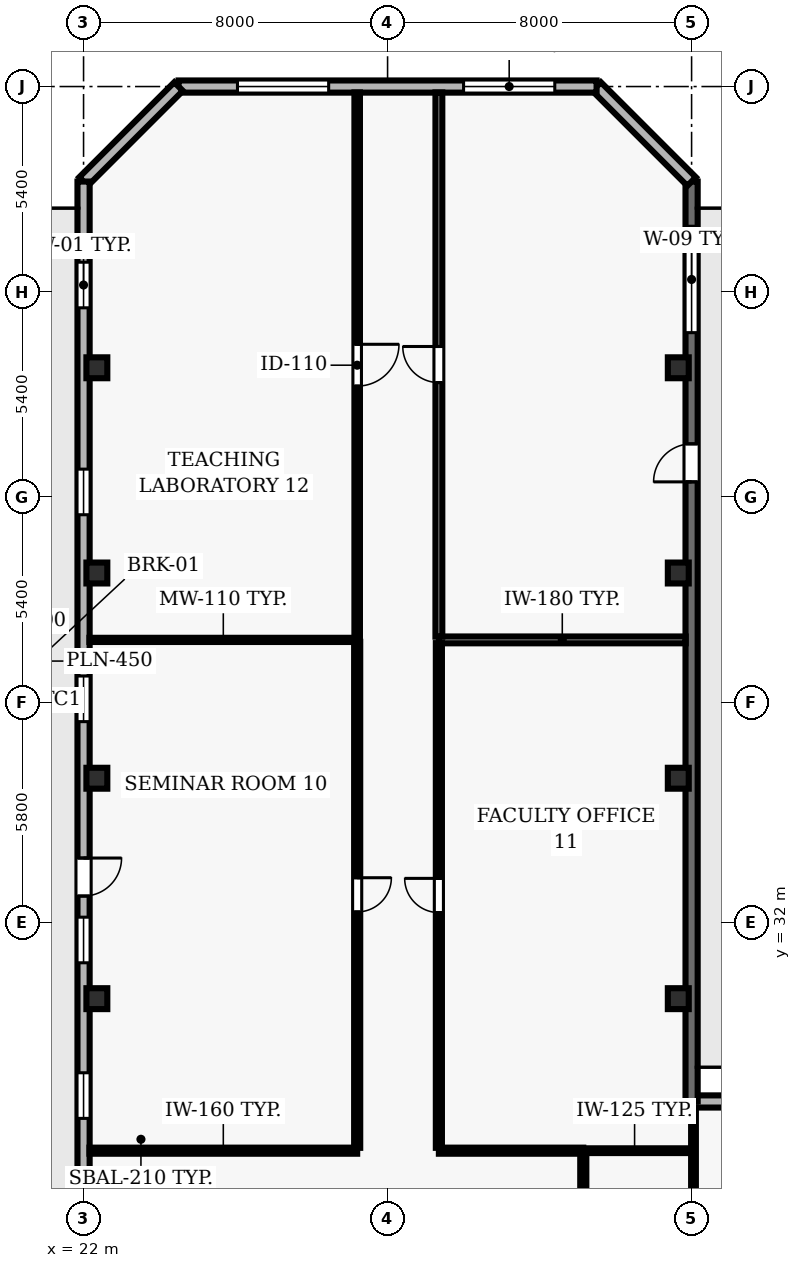
"""IFC4 building model, lengths in metres.
Left out: names, types, materials, properties, quantities, classifications, styles, units other than length and angle.
Written with IfcOpenShell. Run it as: python <this file> out.ifc"""

import sys

from ifc_helpers import new_model, si_unit, direction, frame, frame_2d, origin, origin_2d, place, context, subcontext, project, spatial, rectangle, hollow_rectangle, extrude, element, fill, save


model = new_model("IFC4")
c1 = context("Model", 3, precision=1e-05, world=origin(), true_north=direction((0.0, 1.0)))
c2 = subcontext(c1, "Body", "Model", "MODEL_VIEW")
j1 = project(units=[si_unit("LENGTHUNIT", "METRE"), si_unit("PLANEANGLEUNIT", "RADIAN")], contexts=[c1])
p1 = place(None, origin())
s1 = spatial("IfcSite", under=j1, at=p1, CompositionType="ELEMENT")
p2 = place(p1, origin())
s2 = spatial("IfcBuilding", under=s1, at=p2, CompositionType="ELEMENT")
p3 = place(p2, frame((0.0, 0.0, 54.4)))
s3 = spatial("IfcBuildingStorey", under=s2, at=p3, CompositionType="ELEMENT", Elevation=54.4)
for number, where, z_axis, x_axis in (
    (1, (22.35, 30.0, 0.0), (0.0, 0.0, 1.0), (1.0, 0.0, 0.0)),
    (2, (37.65, 30.0, 0.0), (0.0, 0.0, 1.0), (1.0, 0.0, 0.0)),
    (3, (22.35, 35.8, 0.0), (0.0, 0.0, 1.0), (1.0, 0.0, 0.0)),
    (4, (37.65, 35.8, 0.0), (0.0, 0.0, 1.0), (1.0, 0.0, 0.0)),
    (5, (22.35, 41.2, 0.0), (0.0, 0.0, 1.0), (1.0, 0.0, 0.0)),
    (6, (37.65, 41.2, 0.0), (0.0, 0.0, 1.0), (1.0, 0.0, 0.0)),
    (7, (22.35, 46.6, 0.0), (0.0, 0.0, 1.0), (1.0, 0.0, 0.0)),
    (8, (37.65, 46.6, 0.0), (0.0, 0.0, 1.0), (1.0, 0.0, 0.0)),
):
    element("IfcColumn", number, at=place(p3, frame(where, z_axis=z_axis, x_axis=x_axis)), inside=s3, PredefinedType="COLUMN", context=c2, shape_type="SweptSolid", body=[
        extrude(hollow_rectangle(XDim=0.55, YDim=0.55, WallThickness=0.025, at=origin_2d()), origin(), (0.0, 0.0, 1.0), 3.9),
    ])
p4 = place(p3, frame((51.4, 27.295, 0.0), z_axis=(0.0, 0.0, 1.0), x_axis=(-1.0, 0.0, 0.0)))
e9 = element("IfcWall", 9, at=p4, inside=s3, PredefinedType="SOLIDWALL", context=c2, shape_type="SweptSolid", body=[
    extrude(rectangle(XDim=13.4, YDim=0.32, at=frame_2d((6.7, 0.0))), origin(), (0.0, 0.0, 1.0), 3.69),
])
p5 = place(p4, frame((2.15, 0.0, 0.9)))
e10 = element("IfcOpeningElement", 10, at=p5, cuts=e9, PredefinedType="OPENING", context=c2, shape_type="SweptSolid", body=[
    extrude(rectangle(XDim=2.4, YDim=1.8, at=frame_2d((1.2, 0.9))), frame((0.0, 0.17, 0.0), z_axis=(0.0, -1.0, 0.0), x_axis=(1.0, 0.0, 0.0)), (0.0, 0.0, 1.0), 0.34),
])
p6 = place(p4, frame((8.85, 0.0, 0.9)))
e11 = element("IfcOpeningElement", 11, at=p6, cuts=e9, PredefinedType="OPENING", context=c2, shape_type="SweptSolid", body=[
    extrude(rectangle(XDim=2.4, YDim=1.8, at=frame_2d((1.2, 0.9))), frame((0.0, 0.17, 0.0), z_axis=(0.0, -1.0, 0.0), x_axis=(1.0, 0.0, 0.0)), (0.0, 0.0, 1.0), 0.34),
])
p7 = place(p3, frame((38.0, 27.295, 0.0), z_axis=(0.0, 0.0, 1.0), x_axis=(0.0, 1.0, 0.0)))
e12 = element("IfcWall", 12, at=p7, inside=s3, PredefinedType="SOLIDWALL", context=c2, shape_type="SweptSolid", body=[
    extrude(rectangle(XDim=24.205, YDim=0.32, at=frame_2d((12.103, 0.0))), origin(), (0.0, 0.0, 1.0), 3.69),
])
p8 = place(p7, frame((16.303, 0.0, 0.0)))
e13 = element("IfcOpeningElement", 13, at=p8, cuts=e12, PredefinedType="OPENING", context=c2, shape_type="SweptSolid", body=[
    extrude(rectangle(XDim=1.0, YDim=2.2, at=frame_2d((0.5, 1.1))), frame((0.0, 0.17, 0.0), z_axis=(0.0, -1.0, 0.0), x_axis=(1.0, 0.0, 0.0)), (0.0, 0.0, 1.0), 0.34),
])
p9 = place(p7, frame((20.229, 0.0, 0.9)))
e14 = element("IfcOpeningElement", 14, at=p9, cuts=e12, PredefinedType="OPENING", context=c2, shape_type="SweptSolid", body=[
    extrude(rectangle(XDim=2.8, YDim=1.8, at=frame_2d((1.4, 0.9))), frame((0.0, 0.17, 0.0), z_axis=(0.0, -1.0, 0.0), x_axis=(1.0, 0.0, 0.0)), (0.0, 0.0, 1.0), 0.34),
])
p10 = place(p3, frame((38.0, 51.5, 0.0), z_axis=(0.0, 0.0, 1.0), x_axis=(-0.707106781187, 0.707106781187, 0.0)))
e15 = element("IfcWall", 15, at=p10, inside=s3, PredefinedType="SOLIDWALL", context=c2, shape_type="SweptSolid", body=[
    extrude(rectangle(XDim=3.536, YDim=0.32, at=frame_2d((1.768, 0.0))), origin(), (0.0, 0.0, 1.0), 3.69),
])
p11 = place(p3, frame((35.5, 54.0, 0.0), z_axis=(0.0, 0.0, 1.0), x_axis=(-1.0, 0.0, 0.0)))
e16 = element("IfcWall", 16, at=p11, inside=s3, PredefinedType="SOLIDWALL", context=c2, shape_type="SweptSolid", body=[
    extrude(rectangle(XDim=11.0, YDim=0.32, at=frame_2d((5.5, 0.0))), origin(), (0.0, 0.0, 1.0), 3.69),
])
p12 = place(p11, frame((1.1, 0.0, 0.9)))
e17 = element("IfcOpeningElement", 17, at=p12, cuts=e16, PredefinedType="OPENING", context=c2, shape_type="SweptSolid", body=[
    extrude(rectangle(XDim=2.4, YDim=2.2, at=frame_2d((1.2, 1.1))), frame((0.0, 0.17, 0.0), z_axis=(0.0, -1.0, 0.0), x_axis=(1.0, 0.0, 0.0)), (0.0, 0.0, 1.0), 0.34),
])
p13 = place(p11, frame((7.05, 0.0, 0.9)))
e18 = element("IfcOpeningElement", 18, at=p13, cuts=e16, PredefinedType="OPENING", context=c2, shape_type="SweptSolid", body=[
    extrude(rectangle(XDim=2.4, YDim=2.2, at=frame_2d((1.2, 1.1))), frame((0.0, 0.17, 0.0), z_axis=(0.0, -1.0, 0.0), x_axis=(1.0, 0.0, 0.0)), (0.0, 0.0, 1.0), 0.34),
])
p14 = place(p3, frame((24.5, 54.0, 0.0), z_axis=(0.0, 0.0, 1.0), x_axis=(-0.707106781187, -0.707106781187, 0.0)))
e19 = element("IfcWall", 19, at=p14, inside=s3, PredefinedType="SOLIDWALL", context=c2, shape_type="SweptSolid", body=[
    extrude(rectangle(XDim=3.536, YDim=0.32, at=frame_2d((1.768, 0.0))), origin(), (0.0, 0.0, 1.0), 3.69),
])
p15 = place(p3, frame((22.0, 51.5, 0.0), z_axis=(0.0, 0.0, 1.0), x_axis=(0.0, -1.0, 0.0)))
e20 = element("IfcWall", 20, at=p15, inside=s3, PredefinedType="SOLIDWALL", context=c2, shape_type="SweptSolid", body=[
    extrude(rectangle(XDim=49.0, YDim=0.32, at=frame_2d((24.5, 0.0))), origin(), (0.0, 0.0, 1.0), 3.69),
])
p16 = place(p15, frame((17.8, 0.0, 0.0)))
e21 = element("IfcOpeningElement", 21, at=p16, cuts=e20, PredefinedType="OPENING", context=c2, shape_type="SweptSolid", body=[
    extrude(rectangle(XDim=1.0, YDim=2.2, at=frame_2d((0.5, 1.1))), frame((0.0, 0.17, 0.0), z_axis=(0.0, -1.0, 0.0), x_axis=(1.0, 0.0, 0.0)), (0.0, 0.0, 1.0), 0.34),
])
p17 = place(p15, frame((2.122, 0.0, 0.9)))
e22 = element("IfcOpeningElement", 22, at=p17, cuts=e20, PredefinedType="OPENING", context=c2, shape_type="SweptSolid", body=[
    extrude(rectangle(XDim=1.2, YDim=1.6, at=frame_2d((0.6, 0.8))), frame((0.0, 0.17, 0.0), z_axis=(0.0, -1.0, 0.0), x_axis=(1.0, 0.0, 0.0)), (0.0, 0.0, 1.0), 0.34),
])
p18 = place(p15, frame((7.567, 0.0, 0.9)))
e23 = element("IfcOpeningElement", 23, at=p18, cuts=e20, PredefinedType="OPENING", context=c2, shape_type="SweptSolid", body=[
    extrude(rectangle(XDim=1.2, YDim=1.6, at=frame_2d((0.6, 0.8))), frame((0.0, 0.17, 0.0), z_axis=(0.0, -1.0, 0.0), x_axis=(1.0, 0.0, 0.0)), (0.0, 0.0, 1.0), 0.34),
])
p19 = place(p15, frame((13.011, 0.0, 0.9)))
e24 = element("IfcOpeningElement", 24, at=p19, cuts=e20, PredefinedType="OPENING", context=c2, shape_type="SweptSolid", body=[
    extrude(rectangle(XDim=1.2, YDim=1.6, at=frame_2d((0.6, 0.8))), frame((0.0, 0.17, 0.0), z_axis=(0.0, -1.0, 0.0), x_axis=(1.0, 0.0, 0.0)), (0.0, 0.0, 1.0), 0.34),
])
p20 = place(p15, frame((19.356, 0.0, 0.9)))
e25 = element("IfcOpeningElement", 25, at=p20, cuts=e20, PredefinedType="OPENING", context=c2, shape_type="SweptSolid", body=[
    extrude(rectangle(XDim=1.2, YDim=1.6, at=frame_2d((0.6, 0.8))), frame((0.0, 0.17, 0.0), z_axis=(0.0, -1.0, 0.0), x_axis=(1.0, 0.0, 0.0)), (0.0, 0.0, 1.0), 0.34),
])
p21 = place(p15, frame((23.45, 0.0, 0.9)))
e26 = element("IfcOpeningElement", 26, at=p21, cuts=e20, PredefinedType="OPENING", context=c2, shape_type="SweptSolid", body=[
    extrude(rectangle(XDim=1.2, YDim=1.6, at=frame_2d((0.6, 0.8))), frame((0.0, 0.17, 0.0), z_axis=(0.0, -1.0, 0.0), x_axis=(1.0, 0.0, 0.0)), (0.0, 0.0, 1.0), 0.34),
])
p22 = place(p15, frame((29.344, 0.0, 0.9)))
e27 = element("IfcOpeningElement", 27, at=p22, cuts=e20, PredefinedType="OPENING", context=c2, shape_type="SweptSolid", body=[
    extrude(rectangle(XDim=1.2, YDim=1.6, at=frame_2d((0.6, 0.8))), frame((0.0, 0.17, 0.0), z_axis=(0.0, -1.0, 0.0), x_axis=(1.0, 0.0, 0.0)), (0.0, 0.0, 1.0), 0.34),
])
p23 = place(p15, frame((34.789, 0.0, 0.9)))
e28 = element("IfcOpeningElement", 28, at=p23, cuts=e20, PredefinedType="OPENING", context=c2, shape_type="SweptSolid", body=[
    extrude(rectangle(XDim=1.2, YDim=1.6, at=frame_2d((0.6, 0.8))), frame((0.0, 0.17, 0.0), z_axis=(0.0, -1.0, 0.0), x_axis=(1.0, 0.0, 0.0)), (0.0, 0.0, 1.0), 0.34),
])
p24 = place(p15, frame((40.233, 0.0, 0.9)))
e29 = element("IfcOpeningElement", 29, at=p24, cuts=e20, PredefinedType="OPENING", context=c2, shape_type="SweptSolid", body=[
    extrude(rectangle(XDim=1.2, YDim=1.6, at=frame_2d((0.6, 0.8))), frame((0.0, 0.17, 0.0), z_axis=(0.0, -1.0, 0.0), x_axis=(1.0, 0.0, 0.0)), (0.0, 0.0, 1.0), 0.34),
])
p25 = place(p15, frame((44.778, 0.0, 0.9)))
e30 = element("IfcOpeningElement", 30, at=p25, cuts=e20, PredefinedType="OPENING", context=c2, shape_type="SweptSolid", body=[
    extrude(rectangle(XDim=1.2, YDim=1.6, at=frame_2d((0.6, 0.8))), frame((0.0, 0.17, 0.0), z_axis=(0.0, -1.0, 0.0), x_axis=(1.0, 0.0, 0.0)), (0.0, 0.0, 1.0), 0.34),
])
p26 = place(p3, frame((29.2, 26.0, 0.0), z_axis=(0.0, 0.0, 1.0), x_axis=(-1.0, 0.0, 0.0)))
e31 = element("IfcWall", 31, at=p26, inside=s3, PredefinedType="PARTITIONING", context=c2, shape_type="SweptSolid", body=[
    extrude(rectangle(XDim=7.045, YDim=0.16, at=frame_2d((3.522, 0.0))), origin(), (0.0, 0.0, 1.0), 3.69),
])
p27 = place(p3, frame((29.2, 39.44, 0.0), z_axis=(0.0, 0.0, 1.0), x_axis=(-1.0, 0.0, 0.0)))
e32 = element("IfcWall", 32, at=p27, inside=s3, PredefinedType="MOVABLE", context=c2, shape_type="SweptSolid", body=[
    extrude(rectangle(XDim=7.045, YDim=0.11, at=frame_2d((3.522, 0.0))), origin(), (0.0, 0.0, 1.0), 3.69),
])
p28 = place(p3, frame((35.15, 26.0, 0.0), z_axis=(0.0, 0.0, 1.0), x_axis=(-1.0, 0.0, 0.0)))
e33 = element("IfcWall", 33, at=p28, inside=s3, PredefinedType="PARTITIONING", context=c2, shape_type="SweptSolid", body=[
    extrude(rectangle(XDim=3.8, YDim=0.16, at=frame_2d((1.9, 0.0))), origin(), (0.0, 0.0, 1.0), 3.69),
])
p29 = place(p3, frame((35.15, 26.0, 0.0), z_axis=(0.0, 0.0, 1.0), x_axis=(1.0, 0.0, 0.0)))
e34 = element("IfcWall", 34, at=p29, inside=s3, PredefinedType="PARTITIONING", context=c2, shape_type="SweptSolid", body=[
    extrude(rectangle(XDim=2.7, YDim=0.125, at=frame_2d((1.35, 0.0))), origin(), (0.0, 0.0, 1.0), 3.69),
])
p30 = place(p3, frame((37.845, 39.44, 0.0), z_axis=(0.0, 0.0, 1.0), x_axis=(-1.0, 0.0, 0.0)))
e35 = element("IfcWall", 35, at=p30, inside=s3, PredefinedType="PARTITIONING", context=c2, shape_type="SweptSolid", body=[
    extrude(rectangle(XDim=6.495, YDim=0.18, at=frame_2d((3.248, 0.0))), origin(), (0.0, 0.0, 1.0), 3.69),
])
p31 = place(p3, frame((29.2, 39.39, 0.0), z_axis=(0.0, 0.0, 1.0), x_axis=(0.0, -1.0, 0.0)))
e36 = element("IfcWall", 36, at=p31, inside=s3, PredefinedType="PARTITIONING", context=c2, shape_type="SweptSolid", body=[
    extrude(rectangle(XDim=13.315, YDim=0.16, at=frame_2d((6.657, 0.0))), origin(), (0.0, 0.0, 1.0), 3.69),
])
p32 = place(p31, frame((6.208, 0.0, 0.0)))
e37 = element("IfcOpeningElement", 37, at=p32, cuts=e36, PredefinedType="OPENING", context=c2, shape_type="SweptSolid", body=[
    extrude(rectangle(XDim=0.9, YDim=2.1, at=frame_2d((0.45, 1.05))), frame((0.0, 0.09, 0.0), z_axis=(0.0, -1.0, 0.0), x_axis=(1.0, 0.0, 0.0)), (0.0, 0.0, 1.0), 0.18),
])
p33 = place(p3, frame((29.2, 53.845, 0.0), z_axis=(0.0, 0.0, 1.0), x_axis=(0.0, -1.0, 0.0)))
e38 = element("IfcWall", 38, at=p33, inside=s3, PredefinedType="PARTITIONING", context=c2, shape_type="SweptSolid", body=[
    extrude(rectangle(XDim=14.355, YDim=0.145, at=frame_2d((7.177, 0.0))), origin(), (0.0, 0.0, 1.0), 3.69),
])
p34 = place(p33, frame((6.627, 0.0, 0.0)))
e39 = element("IfcOpeningElement", 39, at=p34, cuts=e38, PredefinedType="OPENING", context=c2, shape_type="SweptSolid", body=[
    extrude(rectangle(XDim=1.1, YDim=2.15, at=frame_2d((0.55, 1.075))), frame((0.0, 0.083, 0.0), z_axis=(0.0, -1.0, 0.0), x_axis=(1.0, 0.0, 0.0)), (0.0, 0.0, 1.0), 0.165),
])
p35 = place(p3, frame((31.35, 26.075, 0.0), z_axis=(0.0, 0.0, 1.0), x_axis=(0.0, 1.0, 0.0)))
e40 = element("IfcWall", 40, at=p35, inside=s3, PredefinedType="PARTITIONING", context=c2, shape_type="SweptSolid", body=[
    extrude(rectangle(XDim=13.28, YDim=0.16, at=frame_2d((6.64, 0.0))), origin(), (0.0, 0.0, 1.0), 3.69),
])
p36 = place(p35, frame((6.19, 0.0, 0.0)))
e41 = element("IfcOpeningElement", 41, at=p36, cuts=e40, PredefinedType="OPENING", context=c2, shape_type="SweptSolid", body=[
    extrude(rectangle(XDim=0.9, YDim=2.1, at=frame_2d((0.45, 1.05))), frame((0.0, 0.09, 0.0), z_axis=(0.0, -1.0, 0.0), x_axis=(1.0, 0.0, 0.0)), (0.0, 0.0, 1.0), 0.18),
])
p37 = place(p3, frame((31.35, 39.525, 0.0), z_axis=(0.0, 0.0, 1.0), x_axis=(0.0, 1.0, 0.0)))
e42 = element("IfcWall", 42, at=p37, inside=s3, PredefinedType="PARTITIONING", context=c2, shape_type="SweptSolid", body=[
    extrude(rectangle(XDim=14.32, YDim=0.18, at=frame_2d((7.16, 0.0))), origin(), (0.0, 0.0, 1.0), 3.69),
])
p38 = place(p37, frame((6.685, 0.0, 0.0)))
e43 = element("IfcOpeningElement", 43, at=p38, cuts=e42, PredefinedType="OPENING", context=c2, shape_type="SweptSolid", body=[
    extrude(rectangle(XDim=0.95, YDim=2.1, at=frame_2d((0.475, 1.05))), frame((0.0, 0.1, 0.0), z_axis=(0.0, -1.0, 0.0), x_axis=(1.0, 0.0, 0.0)), (0.0, 0.0, 1.0), 0.2),
])
p39 = place(p3, frame((35.15, 24.07, 0.0), z_axis=(0.0, 0.0, 1.0), x_axis=(0.0, 1.0, 0.0)))
e44 = element("IfcWall", 44, at=p39, inside=s3, PredefinedType="PARTITIONING", context=c2, shape_type="SweptSolid", body=[
    extrude(rectangle(XDim=1.855, YDim=0.16, at=frame_2d((0.927, 0.0))), origin(), (0.0, 0.0, 1.0), 3.69),
])
p40 = place(p3, frame((38.05, 27.14, 0.0), z_axis=(0.0, 0.0, 1.0), x_axis=(0.0, -1.0, 0.0)))
e45 = element("IfcWall", 45, at=p40, inside=s3, PredefinedType="PARTITIONING", context=c2, shape_type="SweptSolid", body=[
    extrude(rectangle(XDim=3.09, YDim=0.125, at=frame_2d((1.545, 0.0))), origin(), (0.0, 0.0, 1.0), 2.995),
])
p41 = place(p8, origin())
e46 = element("IfcDoor", 46, at=p41, inside=s3, OperationType="SINGLE_SWING_LEFT", PredefinedType="DOOR", context=c2, shape_type="SweptSolid", body=[
    extrude(rectangle(XDim=1.0, YDim=2.2, at=frame_2d((0.5, 1.1))), frame((0.0, 0.025, 0.0), z_axis=(0.0, -1.0, 0.0), x_axis=(1.0, 0.0, 0.0)), (0.0, 0.0, 1.0), 0.05),
])
fill(e13, e46)
p42 = place(p9, origin())
e47 = element("IfcWindow", 47, at=p42, inside=s3, PartitioningType="SINGLE_PANEL", PredefinedType="WINDOW", context=c2, shape_type="SweptSolid", body=[
    extrude(rectangle(XDim=2.8, YDim=1.8, at=frame_2d((1.4, 0.9))), frame((0.0, 0.03, 0.0), z_axis=(0.0, -1.0, 0.0), x_axis=(1.0, 0.0, 0.0)), (0.0, 0.0, 1.0), 0.06),
])
fill(e14, e47)
p43 = place(p12, origin())
e48 = element("IfcWindow", 48, at=p43, inside=s3, PartitioningType="SINGLE_PANEL", PredefinedType="WINDOW", context=c2, shape_type="SweptSolid", body=[
    extrude(rectangle(XDim=2.4, YDim=2.2, at=frame_2d((1.2, 1.1))), frame((0.0, 0.03, 0.0), z_axis=(0.0, -1.0, 0.0), x_axis=(1.0, 0.0, 0.0)), (0.0, 0.0, 1.0), 0.06),
])
fill(e17, e48)
p44 = place(p13, origin())
e49 = element("IfcWindow", 49, at=p44, inside=s3, PartitioningType="SINGLE_PANEL", PredefinedType="WINDOW", context=c2, shape_type="SweptSolid", body=[
    extrude(rectangle(XDim=2.4, YDim=2.2, at=frame_2d((1.2, 1.1))), frame((0.0, 0.03, 0.0), z_axis=(0.0, -1.0, 0.0), x_axis=(1.0, 0.0, 0.0)), (0.0, 0.0, 1.0), 0.06),
])
fill(e18, e49)
p45 = place(p16, origin())
e50 = element("IfcDoor", 50, at=p45, inside=s3, OperationType="SINGLE_SWING_LEFT", PredefinedType="DOOR", context=c2, shape_type="SweptSolid", body=[
    extrude(rectangle(XDim=1.0, YDim=2.2, at=frame_2d((0.5, 1.1))), frame((0.0, 0.025, 0.0), z_axis=(0.0, -1.0, 0.0), x_axis=(1.0, 0.0, 0.0)), (0.0, 0.0, 1.0), 0.05),
])
fill(e21, e50)
p46 = place(p17, origin())
e51 = element("IfcWindow", 51, at=p46, inside=s3, PartitioningType="SINGLE_PANEL", PredefinedType="WINDOW", context=c2, shape_type="SweptSolid", body=[
    extrude(rectangle(XDim=1.2, YDim=1.6, at=frame_2d((0.6, 0.8))), frame((0.0, 0.03, 0.0), z_axis=(0.0, -1.0, 0.0), x_axis=(1.0, 0.0, 0.0)), (0.0, 0.0, 1.0), 0.06),
])
fill(e22, e51)
p47 = place(p18, origin())
e52 = element("IfcWindow", 52, at=p47, inside=s3, PartitioningType="SINGLE_PANEL", PredefinedType="WINDOW", context=c2, shape_type="SweptSolid", body=[
    extrude(rectangle(XDim=1.2, YDim=1.6, at=frame_2d((0.6, 0.8))), frame((0.0, 0.03, 0.0), z_axis=(0.0, -1.0, 0.0), x_axis=(1.0, 0.0, 0.0)), (0.0, 0.0, 1.0), 0.06),
])
fill(e23, e52)
p48 = place(p19, origin())
e53 = element("IfcWindow", 53, at=p48, inside=s3, PartitioningType="SINGLE_PANEL", PredefinedType="WINDOW", context=c2, shape_type="SweptSolid", body=[
    extrude(rectangle(XDim=1.2, YDim=1.6, at=frame_2d((0.6, 0.8))), frame((0.0, 0.03, 0.0), z_axis=(0.0, -1.0, 0.0), x_axis=(1.0, 0.0, 0.0)), (0.0, 0.0, 1.0), 0.06),
])
fill(e24, e53)
p49 = place(p20, origin())
e54 = element("IfcWindow", 54, at=p49, inside=s3, PartitioningType="SINGLE_PANEL", PredefinedType="WINDOW", context=c2, shape_type="SweptSolid", body=[
    extrude(rectangle(XDim=1.2, YDim=1.6, at=frame_2d((0.6, 0.8))), frame((0.0, 0.03, 0.0), z_axis=(0.0, -1.0, 0.0), x_axis=(1.0, 0.0, 0.0)), (0.0, 0.0, 1.0), 0.06),
])
fill(e25, e54)
p50 = place(p21, origin())
e55 = element("IfcWindow", 55, at=p50, inside=s3, PartitioningType="SINGLE_PANEL", PredefinedType="WINDOW", context=c2, shape_type="SweptSolid", body=[
    extrude(rectangle(XDim=1.2, YDim=1.6, at=frame_2d((0.6, 0.8))), frame((0.0, 0.03, 0.0), z_axis=(0.0, -1.0, 0.0), x_axis=(1.0, 0.0, 0.0)), (0.0, 0.0, 1.0), 0.06),
])
fill(e26, e55)
p51 = place(p32, origin())
e56 = element("IfcDoor", 56, at=p51, inside=s3, OperationType="SINGLE_SWING_LEFT", PredefinedType="DOOR", context=c2, shape_type="SweptSolid", body=[
    extrude(rectangle(XDim=0.9, YDim=2.1, at=frame_2d((0.45, 1.05))), frame((0.0, 0.025, 0.0), z_axis=(0.0, -1.0, 0.0), x_axis=(1.0, 0.0, 0.0)), (0.0, 0.0, 1.0), 0.05),
])
fill(e37, e56)
p52 = place(p36, origin())
e57 = element("IfcDoor", 57, at=p52, inside=s3, OperationType="SINGLE_SWING_RIGHT", PredefinedType="DOOR", context=c2, shape_type="SweptSolid", body=[
    extrude(rectangle(XDim=0.9, YDim=2.1, at=frame_2d((0.45, 1.05))), frame((0.0, 0.025, 0.0), z_axis=(0.0, -1.0, 0.0), x_axis=(1.0, 0.0, 0.0)), (0.0, 0.0, 1.0), 0.05),
])
fill(e41, e57)
p53 = place(p34, origin())
e58 = element("IfcDoor", 58, at=p53, inside=s3, OperationType="SINGLE_SWING_LEFT", PredefinedType="DOOR", context=c2, shape_type="SweptSolid", body=[
    extrude(rectangle(XDim=1.1, YDim=2.15, at=frame_2d((0.55, 1.075))), frame((0.0, 0.025, 0.0), z_axis=(0.0, -1.0, 0.0), x_axis=(1.0, 0.0, 0.0)), (0.0, 0.0, 1.0), 0.05),
])
fill(e39, e58)
p54 = place(p38, origin())
e59 = element("IfcDoor", 59, at=p54, inside=s3, OperationType="SINGLE_SWING_RIGHT", PredefinedType="DOOR", context=c2, shape_type="SweptSolid", body=[
    extrude(rectangle(XDim=0.95, YDim=2.1, at=frame_2d((0.475, 1.05))), frame((0.0, 0.025, 0.0), z_axis=(0.0, -1.0, 0.0), x_axis=(1.0, 0.0, 0.0)), (0.0, 0.0, 1.0), 0.05),
])
fill(e43, e59)
save(model, sys.argv[1])
